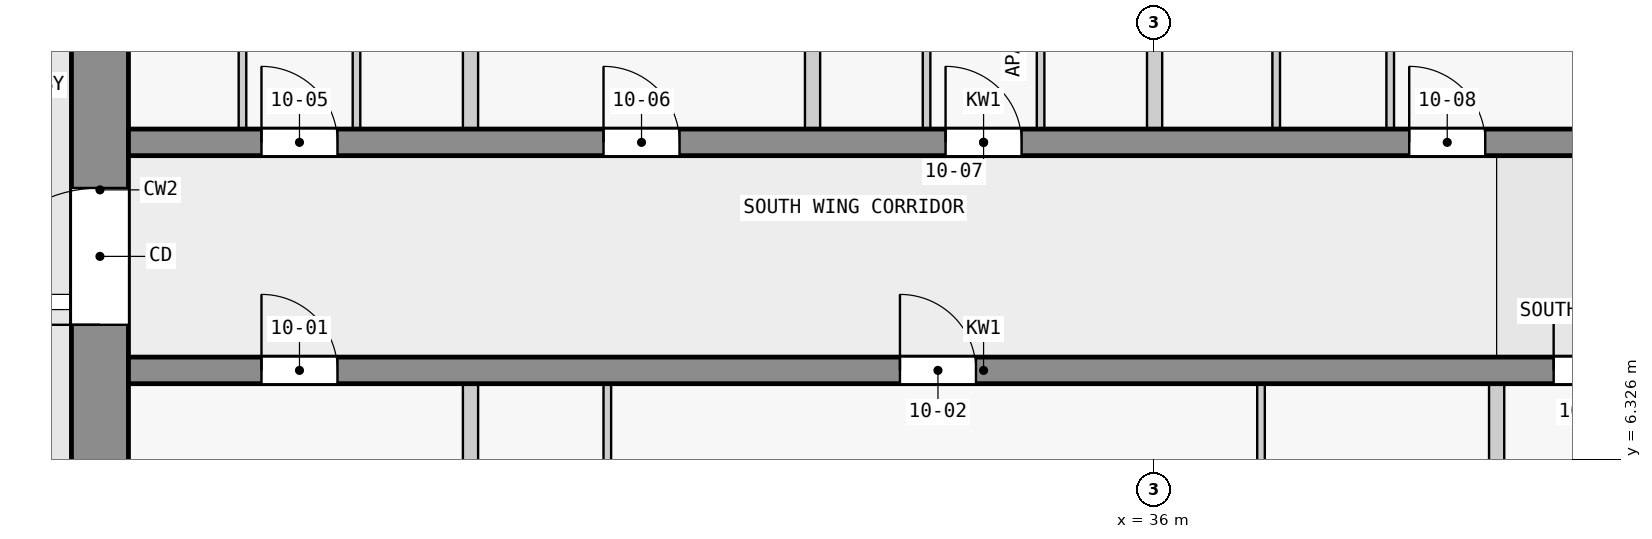
"""IFC4 building model, lengths in metres.
Left out: names, types, materials, properties, quantities, classifications, styles, units other than length and angle.
Written with IfcOpenShell. Run it as: python <this file> out.ifc"""

import sys

from ifc_helpers import new_model, si_unit, direction, frame, frame_2d, origin, place, context, subcontext, project, spatial, rectangle, extrude, element, fill, save


model = new_model("IFC4")
c1 = context("Model", 3, precision=1e-05, world=origin(), true_north=direction((0.0, 1.0)))
c2 = subcontext(c1, "Body", "Model", "MODEL_VIEW")
j1 = project(units=[si_unit("LENGTHUNIT", "METRE"), si_unit("PLANEANGLEUNIT", "RADIAN")], contexts=[c1])
p1 = place(None, origin())
s1 = spatial("IfcSite", under=j1, at=p1, CompositionType="ELEMENT")
p2 = place(p1, origin())
s2 = spatial("IfcBuilding", under=s1, at=p2, CompositionType="ELEMENT")
p3 = place(p2, frame((0.0, 0.0, 44.3)))
s3 = spatial("IfcBuildingStorey", under=s2, at=p3, CompositionType="ELEMENT", Elevation=44.3)
p4 = place(p3, frame((22.125, 2.5, 0.0), z_axis=(0.0, 0.0, 1.0), x_axis=(0.0, 1.0, 0.0)))
e1 = element("IfcWall", 1, at=p4, inside=s3, PredefinedType="SHEAR", context=c2, shape_type="SweptSolid", body=[
    extrude(rectangle(XDim=14.75, YDim=0.75, at=frame_2d((7.375, 0.0))), origin(), (0.0, 0.0, 1.0), 3.25),
])
p5 = place(p4, frame((5.6, 0.0, 0.0)))
e2 = element("IfcOpeningElement", 2, at=p5, cuts=e1, PredefinedType="OPENING", context=c2, shape_type="SweptSolid", body=[
    extrude(rectangle(XDim=1.8, YDim=2.1, at=frame_2d((0.9, 1.05))), frame((0.0, 0.385, 0.0), z_axis=(0.0, -1.0, 0.0), x_axis=(1.0, 0.0, 0.0)), (0.0, 0.0, 1.0), 0.77),
])
p6 = place(p3, frame((22.5, 7.5, 0.0), z_axis=(0.0, 0.0, 1.0), x_axis=(1.0, 0.0, 0.0)))
e3 = element("IfcWall", 3, at=p6, inside=s3, PredefinedType="SHEAR", context=c2, shape_type="SweptSolid", body=[
    extrude(rectangle(XDim=22.5, YDim=0.35, at=frame_2d((11.25, 0.0))), origin(), (0.0, 0.0, 1.0), 3.25),
])
p7 = place(p6, frame((1.75, 0.0, 0.0)))
e4 = element("IfcOpeningElement", 4, at=p7, cuts=e3, PredefinedType="OPENING", context=c2, shape_type="SweptSolid", body=[
    extrude(rectangle(XDim=1.0, YDim=2.1, at=frame_2d((0.5, 1.05))), frame((0.0, 0.185, 0.0), z_axis=(0.0, -1.0, 0.0), x_axis=(1.0, 0.0, 0.0)), (0.0, 0.0, 1.0), 0.37),
])
p8 = place(p6, frame((10.15, 0.0, 0.0)))
e5 = element("IfcOpeningElement", 5, at=p8, cuts=e3, PredefinedType="OPENING", context=c2, shape_type="SweptSolid", body=[
    extrude(rectangle(XDim=1.0, YDim=2.1, at=frame_2d((0.5, 1.05))), frame((0.0, 0.185, 0.0), z_axis=(0.0, -1.0, 0.0), x_axis=(1.0, 0.0, 0.0)), (0.0, 0.0, 1.0), 0.37),
])
p9 = place(p6, frame((18.75, 0.0, 0.0)))
e6 = element("IfcOpeningElement", 6, at=p9, cuts=e3, PredefinedType="OPENING", context=c2, shape_type="SweptSolid", body=[
    extrude(rectangle(XDim=0.9, YDim=2.1, at=frame_2d((0.45, 1.05))), frame((0.0, 0.185, 0.0), z_axis=(0.0, -1.0, 0.0), x_axis=(1.0, 0.0, 0.0)), (0.0, 0.0, 1.0), 0.37),
])
p10 = place(p6, frame((20.95, 0.0, 0.0)))
e7 = element("IfcOpeningElement", 7, at=p10, cuts=e3, PredefinedType="OPENING", context=c2, shape_type="SweptSolid", body=[
    extrude(rectangle(XDim=1.0, YDim=2.1, at=frame_2d((0.5, 1.05))), frame((0.0, 0.185, 0.0), z_axis=(0.0, -1.0, 0.0), x_axis=(1.0, 0.0, 0.0)), (0.0, 0.0, 1.0), 0.37),
])
p11 = place(p3, frame((22.5, 10.5, 0.0), z_axis=(0.0, 0.0, 1.0), x_axis=(1.0, 0.0, 0.0)))
e8 = element("IfcWall", 8, at=p11, inside=s3, PredefinedType="SHEAR", context=c2, shape_type="SweptSolid", body=[
    extrude(rectangle(XDim=22.5, YDim=0.35, at=frame_2d((11.25, 0.0))), origin(), (0.0, 0.0, 1.0), 3.25),
])
p12 = place(p11, frame((1.75, 0.0, 0.0)))
e9 = element("IfcOpeningElement", 9, at=p12, cuts=e8, PredefinedType="OPENING", context=c2, shape_type="SweptSolid", body=[
    extrude(rectangle(XDim=1.0, YDim=2.1, at=frame_2d((0.5, 1.05))), frame((0.0, 0.185, 0.0), z_axis=(0.0, -1.0, 0.0), x_axis=(1.0, 0.0, 0.0)), (0.0, 0.0, 1.0), 0.37),
])
p13 = place(p11, frame((6.25, 0.0, 0.0)))
e10 = element("IfcOpeningElement", 10, at=p13, cuts=e8, PredefinedType="OPENING", context=c2, shape_type="SweptSolid", body=[
    extrude(rectangle(XDim=1.0, YDim=2.1, at=frame_2d((0.5, 1.05))), frame((0.0, 0.185, 0.0), z_axis=(0.0, -1.0, 0.0), x_axis=(1.0, 0.0, 0.0)), (0.0, 0.0, 1.0), 0.37),
])
p14 = place(p11, frame((10.75, 0.0, 0.0)))
e11 = element("IfcOpeningElement", 11, at=p14, cuts=e8, PredefinedType="OPENING", context=c2, shape_type="SweptSolid", body=[
    extrude(rectangle(XDim=1.0, YDim=2.1, at=frame_2d((0.5, 1.05))), frame((0.0, 0.185, 0.0), z_axis=(0.0, -1.0, 0.0), x_axis=(1.0, 0.0, 0.0)), (0.0, 0.0, 1.0), 0.37),
])
p15 = place(p11, frame((16.85, 0.0, 0.0)))
e12 = element("IfcOpeningElement", 12, at=p15, cuts=e8, PredefinedType="OPENING", context=c2, shape_type="SweptSolid", body=[
    extrude(rectangle(XDim=1.0, YDim=2.1, at=frame_2d((0.5, 1.05))), frame((0.0, 0.185, 0.0), z_axis=(0.0, -1.0, 0.0), x_axis=(1.0, 0.0, 0.0)), (0.0, 0.0, 1.0), 0.37),
])
p16 = place(p3, frame((24.0, 10.675, 0.0), z_axis=(0.0, 0.0, 1.0), x_axis=(0.0, 1.0, 0.0)))
e13 = element("IfcWall", 13, at=p16, inside=s3, PredefinedType="PARTITIONING", context=c2, shape_type="SweptSolid", body=[
    extrude(rectangle(XDim=3.4, YDim=0.1, at=frame_2d((1.7, 0.0))), origin(), (0.0, 0.0, 1.0), 3.25),
])
p17 = place(p16, frame((1.25, 0.0, 0.0)))
e14 = element("IfcOpeningElement", 14, at=p17, cuts=e13, PredefinedType="OPENING", context=c2, shape_type="SweptSolid", body=[
    extrude(rectangle(XDim=0.9, YDim=2.1, at=frame_2d((0.45, 1.05))), frame((0.0, 0.06, 0.0), z_axis=(0.0, -1.0, 0.0), x_axis=(1.0, 0.0, 0.0)), (0.0, 0.0, 1.0), 0.12),
])
p18 = place(p3, frame((25.5, 14.075, 0.0), z_axis=(0.0, 0.0, 1.0), x_axis=(0.0, -1.0, 0.0)))
e15 = element("IfcWall", 15, at=p18, inside=s3, PredefinedType="PARTITIONING", context=c2, shape_type="SweptSolid", body=[
    extrude(rectangle(XDim=3.4, YDim=0.1, at=frame_2d((1.7, 0.0))), origin(), (0.0, 0.0, 1.0), 3.25),
])
p19 = place(p18, frame((1.25, 0.0, 0.0)))
e16 = element("IfcOpeningElement", 16, at=p19, cuts=e15, PredefinedType="OPENING", context=c2, shape_type="SweptSolid", body=[
    extrude(rectangle(XDim=0.9, YDim=2.1, at=frame_2d((0.45, 1.05))), frame((0.0, 0.06, 0.0), z_axis=(0.0, -1.0, 0.0), x_axis=(1.0, 0.0, 0.0)), (0.0, 0.0, 1.0), 0.12),
])
p20 = place(p3, frame((27.0, 1.527, 0.0), z_axis=(0.0, 0.0, 1.0), x_axis=(0.0, 1.0, 0.0)))
e17 = element("IfcWall", 17, at=p20, inside=s3, PredefinedType="PARTITIONING", context=c2, shape_type="SweptSolid", body=[
    extrude(rectangle(XDim=5.798, YDim=0.2, at=frame_2d((2.899, 0.0))), origin(), (0.0, 0.0, 1.0), 3.25),
])
p21 = place(p3, frame((27.0, 10.675, 0.0), z_axis=(0.0, 0.0, 1.0), x_axis=(0.0, 1.0, 0.0)))
e18 = element("IfcWall", 18, at=p21, inside=s3, PredefinedType="PARTITIONING", context=c2, shape_type="SweptSolid", body=[
    extrude(rectangle(XDim=3.4, YDim=0.2, at=frame_2d((1.7, 0.0))), origin(), (0.0, 0.0, 1.0), 3.25),
])
p22 = place(p3, frame((28.8, 3.925, 0.0), z_axis=(0.0, 0.0, 1.0), x_axis=(0.0, 1.0, 0.0)))
e19 = element("IfcWall", 19, at=p22, inside=s3, PredefinedType="PARTITIONING", context=c2, shape_type="SweptSolid", body=[
    extrude(rectangle(XDim=3.4, YDim=0.1, at=frame_2d((1.7, 0.0))), origin(), (0.0, 0.0, 1.0), 3.25),
])
p23 = place(p22, frame((1.25, 0.0, 0.0)))
e20 = element("IfcOpeningElement", 20, at=p23, cuts=e19, PredefinedType="OPENING", context=c2, shape_type="SweptSolid", body=[
    extrude(rectangle(XDim=0.9, YDim=2.1, at=frame_2d((0.45, 1.05))), frame((0.0, 0.06, 0.0), z_axis=(0.0, -1.0, 0.0), x_axis=(1.0, 0.0, 0.0)), (0.0, 0.0, 1.0), 0.12),
])
p24 = place(p3, frame((31.5, 10.675, 0.0), z_axis=(0.0, 0.0, 1.0), x_axis=(0.0, 1.0, 0.0)))
e21 = element("IfcWall", 21, at=p24, inside=s3, PredefinedType="PARTITIONING", context=c2, shape_type="SweptSolid", body=[
    extrude(rectangle(XDim=6.203, YDim=0.2, at=frame_2d((3.101, 0.0))), origin(), (0.0, 0.0, 1.0), 3.25),
])
p25 = place(p3, frame((33.0, 10.675, 0.0), z_axis=(0.0, 0.0, 1.0), x_axis=(0.0, 1.0, 0.0)))
e22 = element("IfcWall", 22, at=p25, inside=s3, PredefinedType="PARTITIONING", context=c2, shape_type="SweptSolid", body=[
    extrude(rectangle(XDim=3.4, YDim=0.1, at=frame_2d((1.7, 0.0))), origin(), (0.0, 0.0, 1.0), 3.25),
])
p26 = place(p25, frame((1.25, 0.0, 0.0)))
e23 = element("IfcOpeningElement", 23, at=p26, cuts=e22, PredefinedType="OPENING", context=c2, shape_type="SweptSolid", body=[
    extrude(rectangle(XDim=0.9, YDim=2.1, at=frame_2d((0.45, 1.05))), frame((0.0, 0.06, 0.0), z_axis=(0.0, -1.0, 0.0), x_axis=(1.0, 0.0, 0.0)), (0.0, 0.0, 1.0), 0.12),
])
p27 = place(p3, frame((34.5, 14.025, 0.0), z_axis=(0.0, 0.0, 1.0), x_axis=(0.0, -1.0, 0.0)))
e24 = element("IfcWall", 24, at=p27, inside=s3, PredefinedType="PARTITIONING", context=c2, shape_type="SweptSolid", body=[
    extrude(rectangle(XDim=3.35, YDim=0.1, at=frame_2d((1.675, 0.0))), origin(), (0.0, 0.0, 1.0), 3.25),
])
p28 = place(p27, frame((1.25, 0.0, 0.0)))
e25 = element("IfcOpeningElement", 25, at=p28, cuts=e24, PredefinedType="OPENING", context=c2, shape_type="SweptSolid", body=[
    extrude(rectangle(XDim=0.9, YDim=2.1, at=frame_2d((0.45, 1.05))), frame((0.0, 0.06, 0.0), z_axis=(0.0, -1.0, 0.0), x_axis=(1.0, 0.0, 0.0)), (0.0, 0.0, 1.0), 0.12),
])
p29 = place(p3, frame((36.0, 10.675, 0.0), z_axis=(0.0, 0.0, 1.0), x_axis=(0.0, 1.0, 0.0)))
e26 = element("IfcWall", 26, at=p29, inside=s3, PredefinedType="PARTITIONING", context=c2, shape_type="SweptSolid", body=[
    extrude(rectangle(XDim=3.4, YDim=0.2, at=frame_2d((1.7, 0.0))), origin(), (0.0, 0.0, 1.0), 3.25),
])
p30 = place(p3, frame((37.4, 7.325, 0.0), z_axis=(0.0, 0.0, 1.0), x_axis=(0.0, -1.0, 0.0)))
e27 = element("IfcWall", 27, at=p30, inside=s3, PredefinedType="PARTITIONING", context=c2, shape_type="SweptSolid", body=[
    extrude(rectangle(XDim=3.4, YDim=0.1, at=frame_2d((1.7, 0.0))), origin(), (0.0, 0.0, 1.0), 3.25),
])
p31 = place(p30, frame((1.25, 0.0, 0.0)))
e28 = element("IfcOpeningElement", 28, at=p31, cuts=e27, PredefinedType="OPENING", context=c2, shape_type="SweptSolid", body=[
    extrude(rectangle(XDim=0.9, YDim=2.1, at=frame_2d((0.45, 1.05))), frame((0.0, 0.06, 0.0), z_axis=(0.0, -1.0, 0.0), x_axis=(1.0, 0.0, 0.0)), (0.0, 0.0, 1.0), 0.12),
])
p32 = place(p3, frame((37.6, 10.675, 0.0), z_axis=(0.0, 0.0, 1.0), x_axis=(0.0, 1.0, 0.0)))
e29 = element("IfcWall", 29, at=p32, inside=s3, PredefinedType="PARTITIONING", context=c2, shape_type="SweptSolid", body=[
    extrude(rectangle(XDim=3.35, YDim=0.1, at=frame_2d((1.675, 0.0))), origin(), (0.0, 0.0, 1.0), 3.25),
])
p33 = place(p3, frame((39.1, 10.675, 0.0), z_axis=(0.0, 0.0, 1.0), x_axis=(0.0, 1.0, 0.0)))
e30 = element("IfcWall", 30, at=p33, inside=s3, PredefinedType="PARTITIONING", context=c2, shape_type="SweptSolid", body=[
    extrude(rectangle(XDim=3.35, YDim=0.1, at=frame_2d((1.675, 0.0))), origin(), (0.0, 0.0, 1.0), 3.25),
])
p34 = place(p33, frame((1.25, 0.0, 0.0)))
e31 = element("IfcOpeningElement", 31, at=p34, cuts=e30, PredefinedType="OPENING", context=c2, shape_type="SweptSolid", body=[
    extrude(rectangle(XDim=0.9, YDim=2.1, at=frame_2d((0.45, 1.05))), frame((0.0, 0.06, 0.0), z_axis=(0.0, -1.0, 0.0), x_axis=(1.0, 0.0, 0.0)), (0.0, 0.0, 1.0), 0.12),
])
p35 = place(p3, frame((40.5, 1.122, 0.0), z_axis=(0.0, 0.0, 1.0), x_axis=(0.0, 1.0, 0.0)))
e32 = element("IfcWall", 32, at=p35, inside=s3, PredefinedType="PARTITIONING", context=c2, shape_type="SweptSolid", body=[
    extrude(rectangle(XDim=6.203, YDim=0.2, at=frame_2d((3.101, 0.0))), origin(), (0.0, 0.0, 1.0), 3.25),
])
p36 = place(p5, origin())
e33 = element("IfcDoor", 33, at=p36, inside=s3, OperationType="DOUBLE_DOOR_SINGLE_SWING", PredefinedType="DOOR", context=c2, shape_type="SweptSolid", body=[
    extrude(rectangle(XDim=1.8, YDim=2.1, at=frame_2d((0.9, 1.05))), frame((0.0, 0.025, 0.0), z_axis=(0.0, -1.0, 0.0), x_axis=(1.0, 0.0, 0.0)), (0.0, 0.0, 1.0), 0.05),
])
fill(e2, e33)
p37 = place(p7, origin())
e34 = element("IfcDoor", 34, at=p37, inside=s3, OperationType="SINGLE_SWING_LEFT", PredefinedType="DOOR", context=c2, shape_type="SweptSolid", body=[
    extrude(rectangle(XDim=1.0, YDim=2.1, at=frame_2d((0.5, 1.05))), frame((0.0, 0.025, 0.0), z_axis=(0.0, -1.0, 0.0), x_axis=(1.0, 0.0, 0.0)), (0.0, 0.0, 1.0), 0.05),
])
fill(e4, e34)
p38 = place(p8, origin())
e35 = element("IfcDoor", 35, at=p38, inside=s3, OperationType="SINGLE_SWING_LEFT", PredefinedType="DOOR", context=c2, shape_type="SweptSolid", body=[
    extrude(rectangle(XDim=1.0, YDim=2.1, at=frame_2d((0.5, 1.05))), frame((0.0, 0.025, 0.0), z_axis=(0.0, -1.0, 0.0), x_axis=(1.0, 0.0, 0.0)), (0.0, 0.0, 1.0), 0.05),
])
fill(e5, e35)
p39 = place(p9, origin())
e36 = element("IfcDoor", 36, at=p39, inside=s3, OperationType="SINGLE_SWING_RIGHT", PredefinedType="DOOR", context=c2, shape_type="SweptSolid", body=[
    extrude(rectangle(XDim=0.9, YDim=2.1, at=frame_2d((0.45, 1.05))), frame((0.0, 0.025, 0.0), z_axis=(0.0, -1.0, 0.0), x_axis=(1.0, 0.0, 0.0)), (0.0, 0.0, 1.0), 0.05),
])
fill(e6, e36)
p40 = place(p12, origin())
e37 = element("IfcDoor", 37, at=p40, inside=s3, OperationType="SINGLE_SWING_LEFT", PredefinedType="DOOR", context=c2, shape_type="SweptSolid", body=[
    extrude(rectangle(XDim=1.0, YDim=2.1, at=frame_2d((0.5, 1.05))), frame((0.0, 0.025, 0.0), z_axis=(0.0, -1.0, 0.0), x_axis=(1.0, 0.0, 0.0)), (0.0, 0.0, 1.0), 0.05),
])
fill(e9, e37)
p41 = place(p13, origin())
e38 = element("IfcDoor", 38, at=p41, inside=s3, OperationType="SINGLE_SWING_LEFT", PredefinedType="DOOR", context=c2, shape_type="SweptSolid", body=[
    extrude(rectangle(XDim=1.0, YDim=2.1, at=frame_2d((0.5, 1.05))), frame((0.0, 0.025, 0.0), z_axis=(0.0, -1.0, 0.0), x_axis=(1.0, 0.0, 0.0)), (0.0, 0.0, 1.0), 0.05),
])
fill(e10, e38)
p42 = place(p14, origin())
e39 = element("IfcDoor", 39, at=p42, inside=s3, OperationType="SINGLE_SWING_LEFT", PredefinedType="DOOR", context=c2, shape_type="SweptSolid", body=[
    extrude(rectangle(XDim=1.0, YDim=2.1, at=frame_2d((0.5, 1.05))), frame((0.0, 0.025, 0.0), z_axis=(0.0, -1.0, 0.0), x_axis=(1.0, 0.0, 0.0)), (0.0, 0.0, 1.0), 0.05),
])
fill(e11, e39)
p43 = place(p15, origin())
e40 = element("IfcDoor", 40, at=p43, inside=s3, OperationType="SINGLE_SWING_RIGHT", PredefinedType="DOOR", context=c2, shape_type="SweptSolid", body=[
    extrude(rectangle(XDim=1.0, YDim=2.1, at=frame_2d((0.5, 1.05))), frame((0.0, 0.025, 0.0), z_axis=(0.0, -1.0, 0.0), x_axis=(1.0, 0.0, 0.0)), (0.0, 0.0, 1.0), 0.05),
])
fill(e12, e40)
save(model, sys.argv[1])
